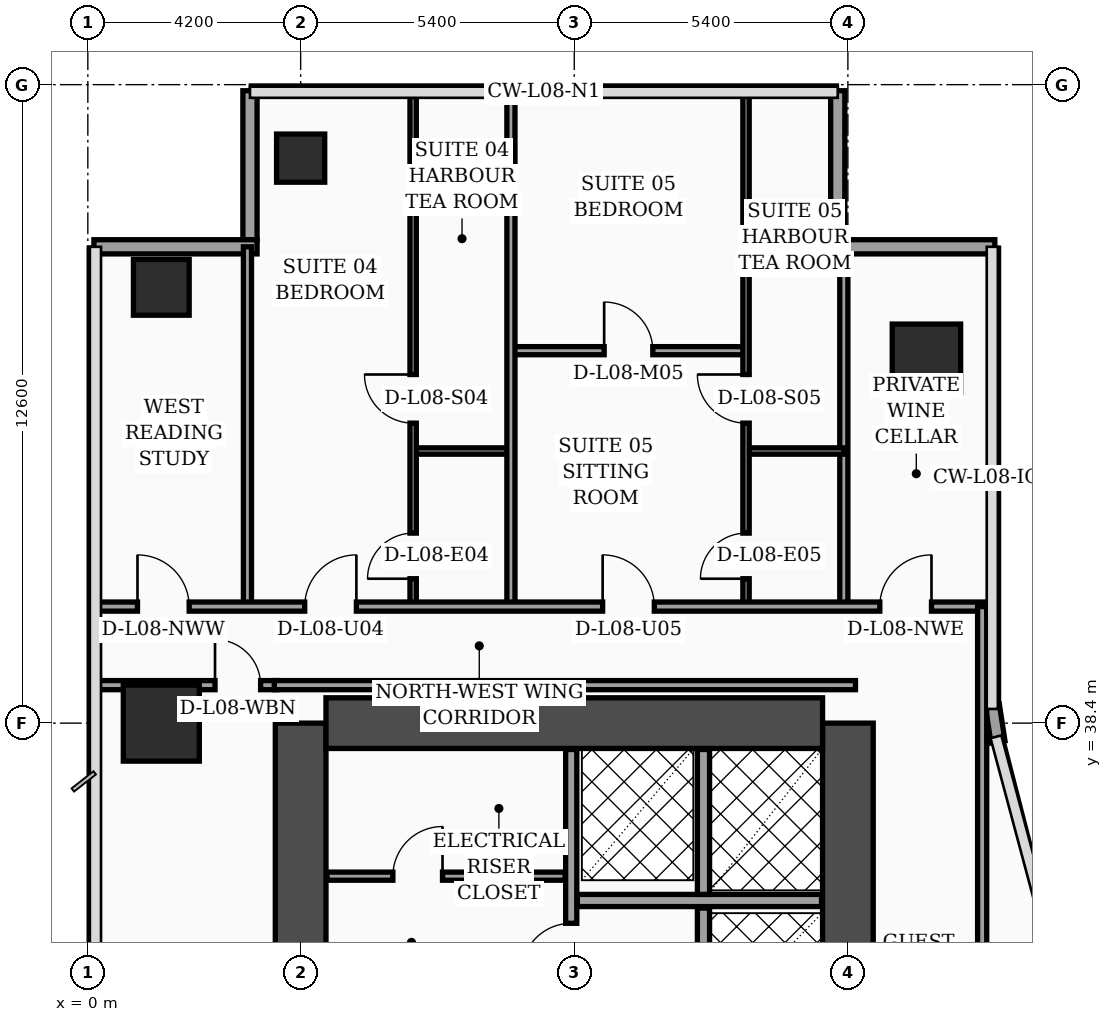
"""IFC4 building model, lengths in metres.
Left out: names, types, materials, properties, quantities, classifications, styles, units other than length and angle.
Written with IfcOpenShell. Run it as: python <this file> out.ifc"""

import sys

from ifc_helpers import new_model, si_unit, direction, frame, frame_2d, origin, origin_2d, place, context, subcontext, project, spatial, rectangle, hollow_rectangle, extrude, element, fill, save


model = new_model("IFC4")
c1 = context("Model", 3, precision=1e-05, world=origin(), true_north=direction((0.0, 1.0)))
c2 = subcontext(c1, "Body", "Model", "MODEL_VIEW")
j1 = project(units=[si_unit("LENGTHUNIT", "METRE"), si_unit("PLANEANGLEUNIT", "RADIAN")], contexts=[c1])
p1 = place(None, origin())
s1 = spatial("IfcSite", under=j1, at=p1, CompositionType="ELEMENT")
p2 = place(p1, origin())
s2 = spatial("IfcBuilding", under=s1, at=p2, CompositionType="ELEMENT")
p3 = place(p2, frame((0.0, 0.0, 38.4)))
s3 = spatial("IfcBuildingStorey", under=s2, at=p3, CompositionType="ELEMENT", Elevation=38.4)
p4 = place(p3, frame((4.2, 16.8, 0.0), z_axis=(0.0, 0.0, 1.0), x_axis=(0.0, 1.0, 0.0)))
e1 = element("IfcWall", 1, at=p4, inside=s3, PredefinedType="SHEAR", context=c2, shape_type="SweptSolid", body=[
    extrude(rectangle(XDim=21.6, YDim=1.0, at=frame_2d((10.8, 0.0))), origin(), (0.0, 0.0, 1.0), 3.56),
])
p5 = place(p3, frame((15.0, 16.8, 0.0), z_axis=(0.0, 0.0, 1.0), x_axis=(0.0, 1.0, 0.0)))
e2 = element("IfcWall", 2, at=p5, inside=s3, PredefinedType="SHEAR", context=c2, shape_type="SweptSolid", body=[
    extrude(rectangle(XDim=21.6, YDim=1.0, at=frame_2d((10.8, 0.0))), origin(), (0.0, 0.0, 1.0), 3.56),
])
p6 = place(p5, frame((8.65, 0.0, 0.0)))
e3 = element("IfcOpeningElement", 3, at=p6, cuts=e2, PredefinedType="OPENING", context=c2, shape_type="SweptSolid", body=[
    extrude(rectangle(XDim=1.1, YDim=2.2, at=frame_2d((0.55, 1.1))), frame((0.0, 0.51, 0.0), z_axis=(0.0, -1.0, 0.0), x_axis=(1.0, 0.0, 0.0)), (0.0, 0.0, 1.0), 1.02),
])
p7 = place(p5, frame((1.25, 0.0, 0.0)))
e4 = element("IfcOpeningElement", 4, at=p7, cuts=e2, PredefinedType="OPENING", context=c2, shape_type="SweptSolid", body=[
    extrude(rectangle(XDim=1.1, YDim=2.2, at=frame_2d((0.55, 1.1))), frame((0.0, 0.51, 0.0), z_axis=(0.0, -1.0, 0.0), x_axis=(1.0, 0.0, 0.0)), (0.0, 0.0, 1.0), 1.02),
])
p8 = place(p5, frame((3.8, 0.0, 0.0)))
e5 = element("IfcOpeningElement", 5, at=p8, cuts=e2, PredefinedType="OPENING", context=c2, shape_type="SweptSolid", body=[
    extrude(rectangle(XDim=1.1, YDim=2.2, at=frame_2d((0.55, 1.1))), frame((0.0, 0.51, 0.0), z_axis=(0.0, -1.0, 0.0), x_axis=(1.0, 0.0, 0.0)), (0.0, 0.0, 1.0), 1.02),
])
p9 = place(p5, frame((6.35, 0.0, 0.0)))
e6 = element("IfcOpeningElement", 6, at=p9, cuts=e2, PredefinedType="OPENING", context=c2, shape_type="SweptSolid", body=[
    extrude(rectangle(XDim=1.1, YDim=2.2, at=frame_2d((0.55, 1.1))), frame((0.0, 0.51, 0.0), z_axis=(0.0, -1.0, 0.0), x_axis=(1.0, 0.0, 0.0)), (0.0, 0.0, 1.0), 1.02),
])
p10 = place(p3, frame((4.7, 38.4, 0.0), z_axis=(0.0, 0.0, 1.0), x_axis=(1.0, 0.0, 0.0)))
e7 = element("IfcWall", 7, at=p10, inside=s3, PredefinedType="SHEAR", context=c2, shape_type="SweptSolid", body=[
    extrude(rectangle(XDim=9.8, YDim=1.0, at=frame_2d((4.9, 0.0))), origin(), (0.0, 0.0, 1.0), 3.56),
])
p11 = place(p3, frame((1.45, 38.4, 0.0), z_axis=(0.0, 0.0, 1.0), x_axis=(1.0, 0.0, 0.0)))
e8 = element("IfcColumn", 8, at=p11, inside=s3, PredefinedType="COLUMN", context=c2, shape_type="SweptSolid", body=[
    extrude(rectangle(XDim=1.5, YDim=1.5, at=origin_2d()), origin(), (0.0, 0.0, 1.0), 3.56),
])
p12 = place(p3, frame((1.45, 47.0, 0.0), z_axis=(0.0, 0.0, 1.0), x_axis=(1.0, 0.0, 0.0)))
e9 = element("IfcColumn", 9, at=p12, inside=s3, PredefinedType="COLUMN", context=c2, shape_type="SweptSolid", body=[
    extrude(hollow_rectangle(XDim=1.1, YDim=1.1, WallThickness=0.045, at=origin_2d()), origin(), (0.0, 0.0, 1.0), 3.56),
])
p13 = place(p3, frame((4.2, 49.55, 0.0), z_axis=(0.0, 0.0, 1.0), x_axis=(1.0, 0.0, 0.0)))
e10 = element("IfcColumn", 10, at=p13, inside=s3, PredefinedType="COLUMN", context=c2, shape_type="SweptSolid", body=[
    extrude(hollow_rectangle(XDim=0.95, YDim=0.95, WallThickness=0.04, at=origin_2d()), origin(), (0.0, 0.0, 1.0), 3.56),
])
p14 = place(p3, frame((16.55, 45.6, 0.0), z_axis=(0.0, 0.0, 1.0), x_axis=(1.0, 0.0, 0.0)))
e11 = element("IfcColumn", 11, at=p14, inside=s3, PredefinedType="COLUMN", context=c2, shape_type="SweptSolid", body=[
    extrude(rectangle(XDim=1.35, YDim=1.35, at=origin_2d()), origin(), (0.0, 0.0, 1.0), 3.56),
])
p15 = place(p3, frame((17.962, 38.03, 0.0), z_axis=(0.0, 0.0, 1.0), x_axis=(-0.15141125477, 0.988470855377, 0.0)))
e12 = element("IfcWall", 12, at=p15, inside=s3, PredefinedType="SOLIDWALL", context=c2, shape_type="SweptSolid", body=[
    extrude(rectangle(XDim=0.739, YDim=0.28, at=frame_2d((0.369, 0.0))), origin(), (0.0, 0.0, 1.0), 3.56),
])
p16 = place(p3, frame((17.9, 47.8, 0.0), z_axis=(0.0, 0.0, 1.0), x_axis=(-1.0, 0.0, 0.0)))
e13 = element("IfcWall", 13, at=p16, inside=s3, PredefinedType="SOLIDWALL", context=c2, shape_type="SweptSolid", body=[
    extrude(rectangle(XDim=3.24, YDim=0.28, at=frame_2d((1.62, 0.0))), origin(), (0.0, 0.0, 1.0), 3.56),
])
p17 = place(p3, frame((14.8, 47.94, 0.0), z_axis=(0.0, 0.0, 1.0), x_axis=(0.0, 1.0, 0.0)))
e14 = element("IfcWall", 14, at=p17, inside=s3, PredefinedType="SOLIDWALL", context=c2, shape_type="SweptSolid", body=[
    extrude(rectangle(XDim=2.94, YDim=0.28, at=frame_2d((1.47, 0.0))), origin(), (0.0, 0.0, 1.0), 3.56),
])
p18 = place(p3, frame((3.2, 50.88, 0.0), z_axis=(0.0, 0.0, 1.0), x_axis=(0.0, -1.0, 0.0)))
e15 = element("IfcWall", 15, at=p18, inside=s3, PredefinedType="SOLIDWALL", context=c2, shape_type="SweptSolid", body=[
    extrude(rectangle(XDim=2.94, YDim=0.28, at=frame_2d((1.47, 0.0))), origin(), (0.0, 0.0, 1.0), 3.04),
])
p19 = place(p3, frame((3.34, 47.8, 0.0), z_axis=(0.0, 0.0, 1.0), x_axis=(-1.0, 0.0, 0.0)))
e16 = element("IfcWall", 16, at=p19, inside=s3, PredefinedType="SOLIDWALL", context=c2, shape_type="SweptSolid", body=[
    extrude(rectangle(XDim=3.22, YDim=0.28, at=frame_2d((1.61, 0.0))), origin(), (0.0, 0.0, 1.0), 3.04),
])
p20 = place(p3, frame((4.72, 35.38, 0.0), z_axis=(0.0, 0.0, 1.0), x_axis=(1.0, 0.0, 0.0)))
e17 = element("IfcWall", 17, at=p20, inside=s3, PredefinedType="PARTITIONING", context=c2, shape_type="SweptSolid", body=[
    extrude(rectangle(XDim=4.7, YDim=0.16, at=frame_2d((2.35, 0.0))), origin(), (0.0, 0.0, 1.0), 3.56),
])
p21 = place(p20, frame((1.3, 0.0, 0.0)))
e18 = element("IfcOpeningElement", 18, at=p21, cuts=e17, PredefinedType="OPENING", context=c2, shape_type="SweptSolid", body=[
    extrude(rectangle(XDim=0.98, YDim=2.15, at=frame_2d((0.49, 1.075))), frame((0.0, 0.09, 0.0), z_axis=(0.0, -1.0, 0.0), x_axis=(1.0, 0.0, 0.0)), (0.0, 0.0, 1.0), 0.18),
])
p22 = place(p3, frame((9.54, 32.92, 0.0), z_axis=(0.0, 0.0, 1.0), x_axis=(0.0, 1.0, 0.0)))
e19 = element("IfcWall", 19, at=p22, inside=s3, PredefinedType="SOLIDWALL", context=c2, shape_type="SweptSolid", body=[
    extrude(rectangle(XDim=4.96, YDim=0.22, at=frame_2d((2.48, 0.0))), origin(), (0.0, 0.0, 1.0), 3.56),
])
p23 = place(p22, frame((0.55, 0.0, 0.0)))
e20 = element("IfcOpeningElement", 20, at=p23, cuts=e19, PredefinedType="OPENING", context=c2, shape_type="SweptSolid", body=[
    extrude(rectangle(XDim=0.98, YDim=2.15, at=frame_2d((0.49, 1.075))), frame((0.0, 0.12, 0.0), z_axis=(0.0, -1.0, 0.0), x_axis=(1.0, 0.0, 0.0)), (0.0, 0.0, 1.0), 0.24),
])
p24 = place(p3, frame((12.15, 27.0, 0.0), z_axis=(0.0, 0.0, 1.0), x_axis=(0.0, 1.0, 0.0)))
e21 = element("IfcWall", 21, at=p24, inside=s3, PredefinedType="SOLIDWALL", context=c2, shape_type="SweptSolid", body=[
    extrude(rectangle(XDim=7.75, YDim=0.24, at=frame_2d((3.875, 0.0))), origin(), (0.0, 0.0, 1.0), 3.56),
])
p25 = place(p3, frame((9.66, 34.9, 0.0), z_axis=(0.0, 0.0, 1.0), x_axis=(1.0, 0.0, 0.0)))
e22 = element("IfcWall", 22, at=p25, inside=s3, PredefinedType="SOLIDWALL", context=c2, shape_type="SweptSolid", body=[
    extrude(rectangle(XDim=4.82, YDim=0.24, at=frame_2d((2.41, 0.0))), origin(), (0.0, 0.0, 1.0), 3.56),
])
p26 = place(p3, frame((12.15, 35.02, 0.0), z_axis=(0.0, 0.0, 1.0), x_axis=(0.0, 1.0, 0.0)))
e23 = element("IfcWall", 23, at=p26, inside=s3, PredefinedType="SOLIDWALL", context=c2, shape_type="SweptSolid", body=[
    extrude(rectangle(XDim=2.86, YDim=0.24, at=frame_2d((1.43, 0.0))), origin(), (0.0, 0.0, 1.0), 3.56),
])
p27 = place(p3, frame((0.08, 39.15, 0.0), z_axis=(0.0, 0.0, 1.0), x_axis=(1.0, 0.0, 0.0)))
e24 = element("IfcWall", 24, at=p27, inside=s3, PredefinedType="PARTITIONING", context=c2, shape_type="SweptSolid", body=[
    extrude(rectangle(XDim=3.65, YDim=0.18, at=frame_2d((1.825, 0.0))), origin(), (0.0, 0.0, 1.0), 2.84),
])
p28 = place(p27, frame((2.43, 0.0, 0.0)))
e25 = element("IfcOpeningElement", 25, at=p28, cuts=e24, PredefinedType="OPENING", context=c2, shape_type="SweptSolid", body=[
    extrude(rectangle(XDim=0.9, YDim=2.15, at=frame_2d((0.45, 1.075))), frame((0.0, 0.1, 0.0), z_axis=(0.0, -1.0, 0.0), x_axis=(1.0, 0.0, 0.0)), (0.0, 0.0, 1.0), 0.2),
])
p29 = place(p3, frame((3.15, 40.7, 0.0), z_axis=(0.0, 0.0, 1.0), x_axis=(0.0, 1.0, 0.0)))
e26 = element("IfcWall", 26, at=p29, inside=s3, PredefinedType="PARTITIONING", context=c2, shape_type="SweptSolid", body=[
    extrude(rectangle(XDim=7.1, YDim=0.16, at=frame_2d((3.55, 0.0))), origin(), (0.0, 0.0, 1.0), 3.14),
])
p30 = place(p3, frame((14.92, 40.7, 0.0), z_axis=(0.0, 0.0, 1.0), x_axis=(0.0, 1.0, 0.0)))
e27 = element("IfcWall", 27, at=p30, inside=s3, PredefinedType="PARTITIONING", context=c2, shape_type="SweptSolid", body=[
    extrude(rectangle(XDim=7.1, YDim=0.16, at=frame_2d((3.55, 0.0))), origin(), (0.0, 0.0, 1.0), 3.04),
])
p31 = place(p3, frame((6.42, 43.77, 0.0), z_axis=(0.0, 0.0, 1.0), x_axis=(1.0, 0.0, 0.0)))
e28 = element("IfcWall", 28, at=p31, inside=s3, PredefinedType="PARTITIONING", context=c2, shape_type="SweptSolid", body=[
    extrude(rectangle(XDim=1.93, YDim=0.125, at=frame_2d((0.965, 0.0))), origin(), (0.0, 0.0, 1.0), 3.56),
])
p32 = place(p3, frame((6.42, 40.7, 0.0), z_axis=(0.0, 0.0, 1.0), x_axis=(0.0, 1.0, 0.0)))
e29 = element("IfcWall", 29, at=p32, inside=s3, PredefinedType="PARTITIONING", context=c2, shape_type="SweptSolid", body=[
    extrude(rectangle(XDim=10.24, YDim=0.125, at=frame_2d((5.12, 0.0))), origin(), (0.0, 0.0, 1.0), 3.04),
])
p33 = place(p32, frame((0.55, 0.0, 0.0)))
e30 = element("IfcOpeningElement", 30, at=p33, cuts=e29, PredefinedType="OPENING", context=c2, shape_type="SweptSolid", body=[
    extrude(rectangle(XDim=0.9, YDim=2.15, at=frame_2d((0.45, 1.075))), frame((0.0, 0.073, 0.0), z_axis=(0.0, -1.0, 0.0), x_axis=(1.0, 0.0, 0.0)), (0.0, 0.0, 1.0), 0.145),
])
p34 = place(p32, frame((3.62, 0.0, 0.0)))
e31 = element("IfcOpeningElement", 31, at=p34, cuts=e29, PredefinedType="OPENING", context=c2, shape_type="SweptSolid", body=[
    extrude(rectangle(XDim=0.96, YDim=2.2, at=frame_2d((0.48, 1.1))), frame((0.0, 0.073, 0.0), z_axis=(0.0, -1.0, 0.0), x_axis=(1.0, 0.0, 0.0)), (0.0, 0.0, 1.0), 0.145),
])
p35 = place(p3, frame((12.99, 43.77, 0.0), z_axis=(0.0, 0.0, 1.0), x_axis=(1.0, 0.0, 0.0)))
e32 = element("IfcWall", 32, at=p35, inside=s3, PredefinedType="PARTITIONING", context=c2, shape_type="SweptSolid", body=[
    extrude(rectangle(XDim=1.93, YDim=0.125, at=frame_2d((0.965, 0.0))), origin(), (0.0, 0.0, 1.0), 3.56),
])
p36 = place(p3, frame((8.35, 45.75, 0.0), z_axis=(0.0, 0.0, 1.0), x_axis=(1.0, 0.0, 0.0)))
e33 = element("IfcWall", 33, at=p36, inside=s3, PredefinedType="PARTITIONING", context=c2, shape_type="SweptSolid", body=[
    extrude(rectangle(XDim=4.64, YDim=0.16, at=frame_2d((2.32, 0.0))), origin(), (0.0, 0.0, 1.0), 3.56),
])
p37 = place(p36, frame((1.84, 0.0, 0.0)))
e34 = element("IfcOpeningElement", 34, at=p37, cuts=e33, PredefinedType="OPENING", context=c2, shape_type="SweptSolid", body=[
    extrude(rectangle(XDim=0.96, YDim=2.2, at=frame_2d((0.48, 1.1))), frame((0.0, 0.09, 0.0), z_axis=(0.0, -1.0, 0.0), x_axis=(1.0, 0.0, 0.0)), (0.0, 0.0, 1.0), 0.18),
])
p38 = place(p3, frame((12.99, 40.7, 0.0), z_axis=(0.0, 0.0, 1.0), x_axis=(0.0, 1.0, 0.0)))
e35 = element("IfcWall", 35, at=p38, inside=s3, PredefinedType="PARTITIONING", context=c2, shape_type="SweptSolid", body=[
    extrude(rectangle(XDim=10.24, YDim=0.125, at=frame_2d((5.12, 0.0))), origin(), (0.0, 0.0, 1.0), 3.04),
])
p39 = place(p38, frame((0.55, 0.0, 0.0)))
e36 = element("IfcOpeningElement", 36, at=p39, cuts=e35, PredefinedType="OPENING", context=c2, shape_type="SweptSolid", body=[
    extrude(rectangle(XDim=0.9, YDim=2.15, at=frame_2d((0.45, 1.075))), frame((0.0, 0.073, 0.0), z_axis=(0.0, -1.0, 0.0), x_axis=(1.0, 0.0, 0.0)), (0.0, 0.0, 1.0), 0.145),
])
p40 = place(p38, frame((3.62, 0.0, 0.0)))
e37 = element("IfcOpeningElement", 37, at=p40, cuts=e35, PredefinedType="OPENING", context=c2, shape_type="SweptSolid", body=[
    extrude(rectangle(XDim=0.96, YDim=2.2, at=frame_2d((0.48, 1.1))), frame((0.0, 0.073, 0.0), z_axis=(0.0, -1.0, 0.0), x_axis=(1.0, 0.0, 0.0)), (0.0, 0.0, 1.0), 0.145),
])
p41 = place(p3, frame((8.35, 40.7, 0.0), z_axis=(0.0, 0.0, 1.0), x_axis=(0.0, 1.0, 0.0)))
e38 = element("IfcWall", 38, at=p41, inside=s3, PredefinedType="PARTITIONING", context=c2, shape_type="SweptSolid", body=[
    extrude(rectangle(XDim=10.24, YDim=0.16, at=frame_2d((5.12, 0.0))), origin(), (0.0, 0.0, 1.0), 3.04),
])
p42 = place(p3, frame((0.08, 40.7, 0.0), z_axis=(0.0, 0.0, 1.0), x_axis=(1.0, 0.0, 0.0)))
e39 = element("IfcWall", 39, at=p42, inside=s3, PredefinedType="PARTITIONING", context=c2, shape_type="SweptSolid", body=[
    extrude(rectangle(XDim=17.77, YDim=0.18, at=frame_2d((8.885, 0.0))), origin(), (0.0, 0.0, 1.0), 2.84),
])
p43 = place(p42, frame((0.9, 0.0, 0.0)))
e40 = element("IfcOpeningElement", 40, at=p43, cuts=e39, PredefinedType="OPENING", context=c2, shape_type="SweptSolid", body=[
    extrude(rectangle(XDim=1.02, YDim=2.2, at=frame_2d((0.51, 1.1))), frame((0.0, 0.1, 0.0), z_axis=(0.0, -1.0, 0.0), x_axis=(1.0, 0.0, 0.0)), (0.0, 0.0, 1.0), 0.2),
])
p44 = place(p42, frame((4.2, 0.0, 0.0)))
e41 = element("IfcOpeningElement", 41, at=p44, cuts=e39, PredefinedType="OPENING", context=c2, shape_type="SweptSolid", body=[
    extrude(rectangle(XDim=1.02, YDim=2.2, at=frame_2d((0.51, 1.1))), frame((0.0, 0.1, 0.0), z_axis=(0.0, -1.0, 0.0), x_axis=(1.0, 0.0, 0.0)), (0.0, 0.0, 1.0), 0.2),
])
p45 = place(p42, frame((10.08, 0.0, 0.0)))
e42 = element("IfcOpeningElement", 42, at=p45, cuts=e39, PredefinedType="OPENING", context=c2, shape_type="SweptSolid", body=[
    extrude(rectangle(XDim=1.02, YDim=2.2, at=frame_2d((0.51, 1.1))), frame((0.0, 0.1, 0.0), z_axis=(0.0, -1.0, 0.0), x_axis=(1.0, 0.0, 0.0)), (0.0, 0.0, 1.0), 0.2),
])
p46 = place(p42, frame((15.55, 0.0, 0.0)))
e43 = element("IfcOpeningElement", 43, at=p46, cuts=e39, PredefinedType="OPENING", context=c2, shape_type="SweptSolid", body=[
    extrude(rectangle(XDim=1.02, YDim=2.2, at=frame_2d((0.51, 1.1))), frame((0.0, 0.1, 0.0), z_axis=(0.0, -1.0, 0.0), x_axis=(1.0, 0.0, 0.0)), (0.0, 0.0, 1.0), 0.2),
])
p47 = place(p3, frame((17.65, 24.3, 0.0), z_axis=(0.0, 0.0, 1.0), x_axis=(0.0, 1.0, 0.0)))
e44 = element("IfcWall", 44, at=p47, inside=s3, PredefinedType="PARTITIONING", context=c2, shape_type="SweptSolid", body=[
    extrude(rectangle(XDim=16.4, YDim=0.18, at=frame_2d((8.2, 0.0))), origin(), (0.0, 0.0, 1.0), 2.84),
])
p48 = place(p3, frame((3.68, 39.15, 0.0), z_axis=(0.0, 0.0, 1.0), x_axis=(1.0, 0.0, 0.0)))
e45 = element("IfcWall", 45, at=p48, inside=s3, PredefinedType="PARTITIONING", context=c2, shape_type="SweptSolid", body=[
    extrude(rectangle(XDim=11.47, YDim=0.18, at=frame_2d((5.735, 0.0))), origin(), (0.0, 0.0, 1.0), 2.84),
])
p49 = place(p21, origin())
e46 = element("IfcDoor", 46, at=p49, inside=s3, OperationType="SINGLE_SWING_RIGHT", PredefinedType="DOOR", context=c2, shape_type="SweptSolid", body=[
    extrude(rectangle(XDim=0.98, YDim=2.15, at=frame_2d((0.49, 1.075))), frame((0.0, 0.025, 0.0), z_axis=(0.0, -1.0, 0.0), x_axis=(1.0, 0.0, 0.0)), (0.0, 0.0, 1.0), 0.05),
])
fill(e18, e46)
p50 = place(p23, origin())
e47 = element("IfcDoor", 47, at=p50, inside=s3, OperationType="SINGLE_SWING_LEFT", PredefinedType="DOOR", context=c2, shape_type="SweptSolid", body=[
    extrude(rectangle(XDim=0.98, YDim=2.15, at=frame_2d((0.49, 1.075))), frame((0.0, 0.025, 0.0), z_axis=(0.0, -1.0, 0.0), x_axis=(1.0, 0.0, 0.0)), (0.0, 0.0, 1.0), 0.05),
])
fill(e20, e47)
p51 = place(p28, origin())
e48 = element("IfcDoor", 48, at=p51, inside=s3, OperationType="SINGLE_SWING_LEFT", PredefinedType="DOOR", context=c2, shape_type="SweptSolid", body=[
    extrude(rectangle(XDim=0.9, YDim=2.15, at=frame_2d((0.45, 1.075))), frame((0.0, 0.025, 0.0), z_axis=(0.0, -1.0, 0.0), x_axis=(1.0, 0.0, 0.0)), (0.0, 0.0, 1.0), 0.05),
])
fill(e25, e48)
p52 = place(p33, origin())
e49 = element("IfcDoor", 49, at=p52, inside=s3, OperationType="SINGLE_SWING_LEFT", PredefinedType="DOOR", context=c2, shape_type="SweptSolid", body=[
    extrude(rectangle(XDim=0.9, YDim=2.15, at=frame_2d((0.45, 1.075))), frame((0.0, 0.025, 0.0), z_axis=(0.0, -1.0, 0.0), x_axis=(1.0, 0.0, 0.0)), (0.0, 0.0, 1.0), 0.05),
])
fill(e30, e49)
p53 = place(p34, origin())
e50 = element("IfcDoor", 50, at=p53, inside=s3, OperationType="SINGLE_SWING_RIGHT", PredefinedType="DOOR", context=c2, shape_type="SweptSolid", body=[
    extrude(rectangle(XDim=0.96, YDim=2.2, at=frame_2d((0.48, 1.1))), frame((0.0, 0.025, 0.0), z_axis=(0.0, -1.0, 0.0), x_axis=(1.0, 0.0, 0.0)), (0.0, 0.0, 1.0), 0.05),
])
fill(e31, e50)
p54 = place(p37, origin())
e51 = element("IfcDoor", 51, at=p54, inside=s3, OperationType="SINGLE_SWING_LEFT", PredefinedType="DOOR", context=c2, shape_type="SweptSolid", body=[
    extrude(rectangle(XDim=0.96, YDim=2.2, at=frame_2d((0.48, 1.1))), frame((0.0, 0.025, 0.0), z_axis=(0.0, -1.0, 0.0), x_axis=(1.0, 0.0, 0.0)), (0.0, 0.0, 1.0), 0.05),
])
fill(e34, e51)
p55 = place(p39, origin())
e52 = element("IfcDoor", 52, at=p55, inside=s3, OperationType="SINGLE_SWING_LEFT", PredefinedType="DOOR", context=c2, shape_type="SweptSolid", body=[
    extrude(rectangle(XDim=0.9, YDim=2.15, at=frame_2d((0.45, 1.075))), frame((0.0, 0.025, 0.0), z_axis=(0.0, -1.0, 0.0), x_axis=(1.0, 0.0, 0.0)), (0.0, 0.0, 1.0), 0.05),
])
fill(e36, e52)
p56 = place(p40, origin())
e53 = element("IfcDoor", 53, at=p56, inside=s3, OperationType="SINGLE_SWING_RIGHT", PredefinedType="DOOR", context=c2, shape_type="SweptSolid", body=[
    extrude(rectangle(XDim=0.96, YDim=2.2, at=frame_2d((0.48, 1.1))), frame((0.0, 0.025, 0.0), z_axis=(0.0, -1.0, 0.0), x_axis=(1.0, 0.0, 0.0)), (0.0, 0.0, 1.0), 0.05),
])
fill(e37, e53)
p57 = place(p43, origin())
e54 = element("IfcDoor", 54, at=p57, inside=s3, OperationType="SINGLE_SWING_LEFT", PredefinedType="DOOR", context=c2, shape_type="SweptSolid", body=[
    extrude(rectangle(XDim=1.02, YDim=2.2, at=frame_2d((0.51, 1.1))), frame((0.0, 0.025, 0.0), z_axis=(0.0, -1.0, 0.0), x_axis=(1.0, 0.0, 0.0)), (0.0, 0.0, 1.0), 0.05),
])
fill(e40, e54)
p58 = place(p44, origin())
e55 = element("IfcDoor", 55, at=p58, inside=s3, OperationType="SINGLE_SWING_RIGHT", PredefinedType="DOOR", context=c2, shape_type="SweptSolid", body=[
    extrude(rectangle(XDim=1.02, YDim=2.2, at=frame_2d((0.51, 1.1))), frame((0.0, 0.025, 0.0), z_axis=(0.0, -1.0, 0.0), x_axis=(1.0, 0.0, 0.0)), (0.0, 0.0, 1.0), 0.05),
])
fill(e41, e55)
p59 = place(p45, origin())
e56 = element("IfcDoor", 56, at=p59, inside=s3, OperationType="SINGLE_SWING_LEFT", PredefinedType="DOOR", context=c2, shape_type="SweptSolid", body=[
    extrude(rectangle(XDim=1.02, YDim=2.2, at=frame_2d((0.51, 1.1))), frame((0.0, 0.025, 0.0), z_axis=(0.0, -1.0, 0.0), x_axis=(1.0, 0.0, 0.0)), (0.0, 0.0, 1.0), 0.05),
])
fill(e42, e56)
p60 = place(p46, origin())
e57 = element("IfcDoor", 57, at=p60, inside=s3, OperationType="SINGLE_SWING_RIGHT", PredefinedType="DOOR", context=c2, shape_type="SweptSolid", body=[
    extrude(rectangle(XDim=1.02, YDim=2.2, at=frame_2d((0.51, 1.1))), frame((0.0, 0.025, 0.0), z_axis=(0.0, -1.0, 0.0), x_axis=(1.0, 0.0, 0.0)), (0.0, 0.0, 1.0), 0.05),
])
fill(e43, e57)
save(model, sys.argv[1])
